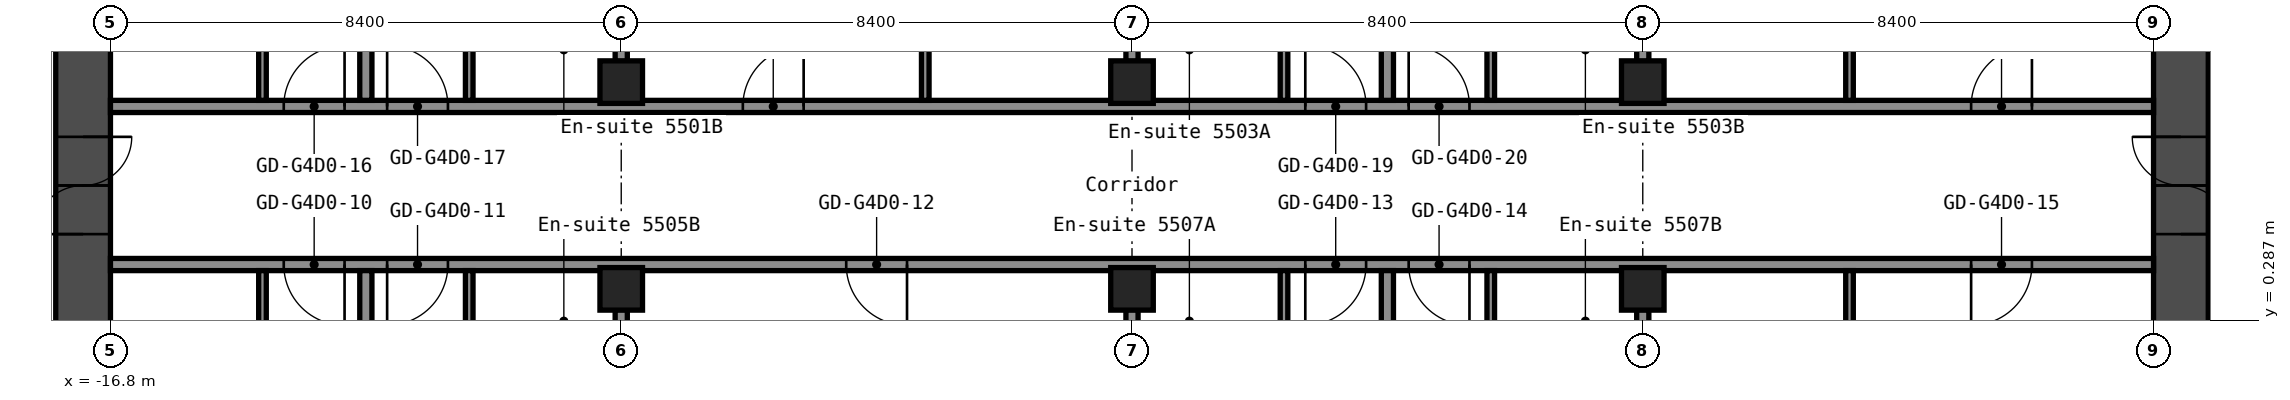
"""IFC4 building model, lengths in metres.
Left out: names, types, materials, properties, quantities, classifications, styles, units other than length and angle.
Written with IfcOpenShell. Run it as: python <this file> out.ifc"""

import sys

from ifc_helpers import new_model, si_unit, direction, frame, frame_2d, origin, origin_2d, place, context, subcontext, project, spatial, rectangle, hollow_rectangle, extrude, element, fill, save


model = new_model("IFC4")
c1 = context("Model", 3, precision=1e-05, world=origin(), true_north=direction((0.0, 1.0)))
c2 = subcontext(c1, "Body", "Model", "MODEL_VIEW")
j1 = project(units=[si_unit("LENGTHUNIT", "METRE"), si_unit("PLANEANGLEUNIT", "RADIAN")], contexts=[c1])
p1 = place(None, origin())
s1 = spatial("IfcSite", under=j1, at=p1, CompositionType="ELEMENT")
p2 = place(p1, origin())
s2 = spatial("IfcBuilding", under=s1, at=p2, CompositionType="ELEMENT")
p3 = place(p2, frame((0.0, 0.0, 196.2)))
s3 = spatial("IfcBuildingStorey", under=s2, at=p3, CompositionType="ELEMENT", Elevation=196.2)
for number, where, z_axis, x_axis in (
    (1, (-8.4, 0.8, 0.0), (0.0, 0.0, 1.0), (1.0, 0.0, 0.0)),
    (2, (-8.4, 4.2, 0.0), (0.0, 0.0, 1.0), (1.0, 0.0, 0.0)),
    (3, (0.0, 0.8, 0.0), (0.0, 0.0, 1.0), (1.0, 0.0, 0.0)),
    (4, (0.0, 4.2, 0.0), (0.0, 0.0, 1.0), (1.0, 0.0, 0.0)),
    (5, (8.4, 0.8, 0.0), (0.0, 0.0, 1.0), (1.0, 0.0, 0.0)),
    (6, (8.4, 4.2, 0.0), (0.0, 0.0, 1.0), (1.0, 0.0, 0.0)),
):
    element("IfcColumn", number, at=place(p3, frame(where, z_axis=z_axis, x_axis=x_axis)), inside=s3, PredefinedType="COLUMN", context=c2, shape_type="SweptSolid", body=[
        extrude(hollow_rectangle(XDim=0.7, YDim=0.7, WallThickness=0.028, at=origin_2d()), origin(), (0.0, 0.0, 1.0), 2.75),
    ])
p4 = place(p3, frame((-17.25, -8.4, 0.0), z_axis=(0.0, 0.0, 1.0), x_axis=(0.0, 1.0, 0.0)))
e7 = element("IfcWall", 7, at=p4, inside=s3, PredefinedType="SHEAR", context=c2, shape_type="SweptSolid", body=[
    extrude(rectangle(XDim=16.8, YDim=0.9, at=frame_2d((8.4, 0.0))), origin(), (0.0, 0.0, 1.0), 2.75),
])
p5 = place(p4, frame((10.1, 0.0, 0.0)))
e8 = element("IfcOpeningElement", 8, at=p5, cuts=e7, PredefinedType="OPENING", context=c2, shape_type="SweptSolid", body=[
    extrude(rectangle(XDim=1.6, YDim=2.1, at=frame_2d((0.8, 1.05))), frame((0.0, 0.46, 0.0), z_axis=(0.0, -1.0, 0.0), x_axis=(1.0, 0.0, 0.0)), (0.0, 0.0, 1.0), 0.92),
])
p6 = place(p3, frame((17.25, -8.4, 0.0), z_axis=(0.0, 0.0, 1.0), x_axis=(0.0, 1.0, 0.0)))
e9 = element("IfcWall", 9, at=p6, inside=s3, PredefinedType="SHEAR", context=c2, shape_type="SweptSolid", body=[
    extrude(rectangle(XDim=16.8, YDim=0.9, at=frame_2d((8.4, 0.0))), origin(), (0.0, 0.0, 1.0), 2.75),
])
p7 = place(p6, frame((10.1, 0.0, 0.0)))
e10 = element("IfcOpeningElement", 10, at=p7, cuts=e9, PredefinedType="OPENING", context=c2, shape_type="SweptSolid", body=[
    extrude(rectangle(XDim=1.6, YDim=2.1, at=frame_2d((0.8, 1.05))), frame((0.0, 0.46, 0.0), z_axis=(0.0, -1.0, 0.0), x_axis=(1.0, 0.0, 0.0)), (0.0, 0.0, 1.0), 0.92),
])
p8 = place(p3, frame((-16.8, 1.2, 0.0), z_axis=(0.0, 0.0, 1.0), x_axis=(1.0, 0.0, 0.0)))
e11 = element("IfcWall", 11, at=p8, inside=s3, PredefinedType="PARTITIONING", context=c2, shape_type="SweptSolid", body=[
    extrude(rectangle(XDim=33.6, YDim=0.2, at=frame_2d((16.8, 0.0))), origin(), (0.0, 0.0, 1.0), 2.75),
])
p9 = place(p8, frame((2.85, 0.0, 0.0)))
e12 = element("IfcOpeningElement", 12, at=p9, cuts=e11, PredefinedType="OPENING", context=c2, shape_type="SweptSolid", body=[
    extrude(rectangle(XDim=1.0, YDim=2.1, at=frame_2d((0.5, 1.05))), frame((0.0, 0.11, 0.0), z_axis=(0.0, -1.0, 0.0), x_axis=(1.0, 0.0, 0.0)), (0.0, 0.0, 1.0), 0.22),
])
p10 = place(p8, frame((4.55, 0.0, 0.0)))
e13 = element("IfcOpeningElement", 13, at=p10, cuts=e11, PredefinedType="OPENING", context=c2, shape_type="SweptSolid", body=[
    extrude(rectangle(XDim=1.0, YDim=2.1, at=frame_2d((0.5, 1.05))), frame((0.0, 0.11, 0.0), z_axis=(0.0, -1.0, 0.0), x_axis=(1.0, 0.0, 0.0)), (0.0, 0.0, 1.0), 0.22),
])
p11 = place(p8, frame((12.1, 0.0, 0.0)))
e14 = element("IfcOpeningElement", 14, at=p11, cuts=e11, PredefinedType="OPENING", context=c2, shape_type="SweptSolid", body=[
    extrude(rectangle(XDim=1.0, YDim=2.1, at=frame_2d((0.5, 1.05))), frame((0.0, 0.11, 0.0), z_axis=(0.0, -1.0, 0.0), x_axis=(1.0, 0.0, 0.0)), (0.0, 0.0, 1.0), 0.22),
])
p12 = place(p8, frame((19.65, 0.0, 0.0)))
e15 = element("IfcOpeningElement", 15, at=p12, cuts=e11, PredefinedType="OPENING", context=c2, shape_type="SweptSolid", body=[
    extrude(rectangle(XDim=1.0, YDim=2.1, at=frame_2d((0.5, 1.05))), frame((0.0, 0.11, 0.0), z_axis=(0.0, -1.0, 0.0), x_axis=(1.0, 0.0, 0.0)), (0.0, 0.0, 1.0), 0.22),
])
p13 = place(p8, frame((21.35, 0.0, 0.0)))
e16 = element("IfcOpeningElement", 16, at=p13, cuts=e11, PredefinedType="OPENING", context=c2, shape_type="SweptSolid", body=[
    extrude(rectangle(XDim=1.0, YDim=2.1, at=frame_2d((0.5, 1.05))), frame((0.0, 0.11, 0.0), z_axis=(0.0, -1.0, 0.0), x_axis=(1.0, 0.0, 0.0)), (0.0, 0.0, 1.0), 0.22),
])
p14 = place(p8, frame((30.6, 0.0, 0.0)))
e17 = element("IfcOpeningElement", 17, at=p14, cuts=e11, PredefinedType="OPENING", context=c2, shape_type="SweptSolid", body=[
    extrude(rectangle(XDim=1.0, YDim=2.1, at=frame_2d((0.5, 1.05))), frame((0.0, 0.11, 0.0), z_axis=(0.0, -1.0, 0.0), x_axis=(1.0, 0.0, 0.0)), (0.0, 0.0, 1.0), 0.22),
])
p15 = place(p3, frame((-16.8, 3.8, 0.0), z_axis=(0.0, 0.0, 1.0), x_axis=(1.0, 0.0, 0.0)))
e18 = element("IfcWall", 18, at=p15, inside=s3, PredefinedType="PARTITIONING", context=c2, shape_type="SweptSolid", body=[
    extrude(rectangle(XDim=33.6, YDim=0.2, at=frame_2d((16.8, 0.0))), origin(), (0.0, 0.0, 1.0), 2.75),
])
p16 = place(p15, frame((2.85, 0.0, 0.0)))
e19 = element("IfcOpeningElement", 19, at=p16, cuts=e18, PredefinedType="OPENING", context=c2, shape_type="SweptSolid", body=[
    extrude(rectangle(XDim=1.0, YDim=2.1, at=frame_2d((0.5, 1.05))), frame((0.0, 0.11, 0.0), z_axis=(0.0, -1.0, 0.0), x_axis=(1.0, 0.0, 0.0)), (0.0, 0.0, 1.0), 0.22),
])
p17 = place(p15, frame((4.55, 0.0, 0.0)))
e20 = element("IfcOpeningElement", 20, at=p17, cuts=e18, PredefinedType="OPENING", context=c2, shape_type="SweptSolid", body=[
    extrude(rectangle(XDim=1.0, YDim=2.1, at=frame_2d((0.5, 1.05))), frame((0.0, 0.11, 0.0), z_axis=(0.0, -1.0, 0.0), x_axis=(1.0, 0.0, 0.0)), (0.0, 0.0, 1.0), 0.22),
])
p18 = place(p15, frame((10.4, 0.0, 0.0)))
e21 = element("IfcOpeningElement", 21, at=p18, cuts=e18, PredefinedType="OPENING", context=c2, shape_type="SweptSolid", body=[
    extrude(rectangle(XDim=1.0, YDim=2.1, at=frame_2d((0.5, 1.05))), frame((0.0, 0.11, 0.0), z_axis=(0.0, -1.0, 0.0), x_axis=(1.0, 0.0, 0.0)), (0.0, 0.0, 1.0), 0.22),
])
p19 = place(p15, frame((19.65, 0.0, 0.0)))
e22 = element("IfcOpeningElement", 22, at=p19, cuts=e18, PredefinedType="OPENING", context=c2, shape_type="SweptSolid", body=[
    extrude(rectangle(XDim=1.0, YDim=2.1, at=frame_2d((0.5, 1.05))), frame((0.0, 0.11, 0.0), z_axis=(0.0, -1.0, 0.0), x_axis=(1.0, 0.0, 0.0)), (0.0, 0.0, 1.0), 0.22),
])
p20 = place(p15, frame((21.35, 0.0, 0.0)))
e23 = element("IfcOpeningElement", 23, at=p20, cuts=e18, PredefinedType="OPENING", context=c2, shape_type="SweptSolid", body=[
    extrude(rectangle(XDim=1.0, YDim=2.1, at=frame_2d((0.5, 1.05))), frame((0.0, 0.11, 0.0), z_axis=(0.0, -1.0, 0.0), x_axis=(1.0, 0.0, 0.0)), (0.0, 0.0, 1.0), 0.22),
])
p21 = place(p15, frame((30.6, 0.0, 0.0)))
e24 = element("IfcOpeningElement", 24, at=p21, cuts=e18, PredefinedType="OPENING", context=c2, shape_type="SweptSolid", body=[
    extrude(rectangle(XDim=1.0, YDim=2.1, at=frame_2d((0.5, 1.05))), frame((0.0, 0.11, 0.0), z_axis=(0.0, -1.0, 0.0), x_axis=(1.0, 0.0, 0.0)), (0.0, 0.0, 1.0), 0.22),
])
p22 = place(p3, frame((-14.3, -1.8, 0.0), z_axis=(0.0, 0.0, 1.0), x_axis=(0.0, 1.0, 0.0)))
e25 = element("IfcWall", 25, at=p22, inside=s3, PredefinedType="PARTITIONING", context=c2, shape_type="SweptSolid", body=[
    extrude(rectangle(XDim=2.9, YDim=0.125, at=frame_2d((1.45, 0.0))), origin(), (0.0, 0.0, 1.0), 2.75),
])
p23 = place(p22, frame((0.6, 0.0, 0.0)))
e26 = element("IfcOpeningElement", 26, at=p23, cuts=e25, PredefinedType="OPENING", context=c2, shape_type="SweptSolid", body=[
    extrude(rectangle(XDim=0.8, YDim=2.1, at=frame_2d((0.4, 1.05))), frame((0.0, 0.073, 0.0), z_axis=(0.0, -1.0, 0.0), x_axis=(1.0, 0.0, 0.0)), (0.0, 0.0, 1.0), 0.145),
])
p24 = place(p3, frame((-14.3, 3.9, 0.0), z_axis=(0.0, 0.0, 1.0), x_axis=(0.0, 1.0, 0.0)))
e27 = element("IfcWall", 27, at=p24, inside=s3, PredefinedType="PARTITIONING", context=c2, shape_type="SweptSolid", body=[
    extrude(rectangle(XDim=2.9, YDim=0.125, at=frame_2d((1.45, 0.0))), origin(), (0.0, 0.0, 1.0), 2.75),
])
p25 = place(p24, frame((1.5, 0.0, 0.0)))
e28 = element("IfcOpeningElement", 28, at=p25, cuts=e27, PredefinedType="OPENING", context=c2, shape_type="SweptSolid", body=[
    extrude(rectangle(XDim=0.8, YDim=2.1, at=frame_2d((0.4, 1.05))), frame((0.0, 0.073, 0.0), z_axis=(0.0, -1.0, 0.0), x_axis=(1.0, 0.0, 0.0)), (0.0, 0.0, 1.0), 0.145),
])
for number, where, z_axis, x_axis in (
    (29, (-12.6, -15.55, 0.0), (0.0, 0.0, 1.0), (0.0, 1.0, 0.0)),
    (30, (-12.6, 3.9, 0.0), (0.0, 0.0, 1.0), (0.0, 1.0, 0.0)),
):
    element("IfcWall", number, at=place(p3, frame(where, z_axis=z_axis, x_axis=x_axis)), inside=s3, PredefinedType="PARTITIONING", context=c2, shape_type="SweptSolid", body=[
        extrude(rectangle(XDim=16.65, YDim=0.2, at=frame_2d((8.325, 0.0))), origin(), (0.0, 0.0, 1.0), 2.75),
    ])
p26 = place(p3, frame((-10.9, -1.8, 0.0), z_axis=(0.0, 0.0, 1.0), x_axis=(0.0, 1.0, 0.0)))
e31 = element("IfcWall", 31, at=p26, inside=s3, PredefinedType="PARTITIONING", context=c2, shape_type="SweptSolid", body=[
    extrude(rectangle(XDim=2.9, YDim=0.125, at=frame_2d((1.45, 0.0))), origin(), (0.0, 0.0, 1.0), 2.75),
])
p27 = place(p26, frame((0.6, 0.0, 0.0)))
e32 = element("IfcOpeningElement", 32, at=p27, cuts=e31, PredefinedType="OPENING", context=c2, shape_type="SweptSolid", body=[
    extrude(rectangle(XDim=0.8, YDim=2.1, at=frame_2d((0.4, 1.05))), frame((0.0, 0.073, 0.0), z_axis=(0.0, -1.0, 0.0), x_axis=(1.0, 0.0, 0.0)), (0.0, 0.0, 1.0), 0.145),
])
p28 = place(p3, frame((-10.9, 3.9, 0.0), z_axis=(0.0, 0.0, 1.0), x_axis=(0.0, 1.0, 0.0)))
e33 = element("IfcWall", 33, at=p28, inside=s3, PredefinedType="PARTITIONING", context=c2, shape_type="SweptSolid", body=[
    extrude(rectangle(XDim=2.9, YDim=0.125, at=frame_2d((1.45, 0.0))), origin(), (0.0, 0.0, 1.0), 2.75),
])
p29 = place(p28, frame((1.5, 0.0, 0.0)))
e34 = element("IfcOpeningElement", 34, at=p29, cuts=e33, PredefinedType="OPENING", context=c2, shape_type="SweptSolid", body=[
    extrude(rectangle(XDim=0.8, YDim=2.1, at=frame_2d((0.4, 1.05))), frame((0.0, 0.073, 0.0), z_axis=(0.0, -1.0, 0.0), x_axis=(1.0, 0.0, 0.0)), (0.0, 0.0, 1.0), 0.145),
])
for number, where, z_axis, x_axis in (
    (35, (-8.4, -15.55, 0.0), (0.0, 0.0, 1.0), (0.0, 1.0, 0.0)),
    (36, (-8.4, 4.54, 0.0), (0.0, 0.0, 1.0), (0.0, 1.0, 0.0)),
):
    element("IfcWall", number, at=place(p3, frame(where, z_axis=z_axis, x_axis=x_axis)), inside=s3, PredefinedType="PARTITIONING", context=c2, shape_type="SweptSolid", body=[
        extrude(rectangle(XDim=16.01, YDim=0.2, at=frame_2d((8.005, 0.0))), origin(), (0.0, 0.0, 1.0), 2.75),
    ])
p30 = place(p3, frame((-3.4, 3.9, 0.0), z_axis=(0.0, 0.0, 1.0), x_axis=(0.0, 1.0, 0.0)))
e37 = element("IfcWall", 37, at=p30, inside=s3, PredefinedType="PARTITIONING", context=c2, shape_type="SweptSolid", body=[
    extrude(rectangle(XDim=3.3, YDim=0.125, at=frame_2d((1.65, 0.0))), origin(), (0.0, 0.0, 1.0), 2.75),
])
for number, where, z_axis, x_axis in (
    (38, (0.0, -15.55, 0.0), (0.0, 0.0, 1.0), (0.0, 1.0, 0.0)),
    (39, (0.0, 4.54, 0.0), (0.0, 0.0, 1.0), (0.0, 1.0, 0.0)),
):
    element("IfcWall", number, at=place(p3, frame(where, z_axis=z_axis, x_axis=x_axis)), inside=s3, PredefinedType="PARTITIONING", context=c2, shape_type="SweptSolid", body=[
        extrude(rectangle(XDim=16.01, YDim=0.2, at=frame_2d((8.005, 0.0))), origin(), (0.0, 0.0, 1.0), 2.75),
    ])
p31 = place(p3, frame((2.5, -1.8, 0.0), z_axis=(0.0, 0.0, 1.0), x_axis=(0.0, 1.0, 0.0)))
e40 = element("IfcWall", 40, at=p31, inside=s3, PredefinedType="PARTITIONING", context=c2, shape_type="SweptSolid", body=[
    extrude(rectangle(XDim=2.9, YDim=0.125, at=frame_2d((1.45, 0.0))), origin(), (0.0, 0.0, 1.0), 2.75),
])
p32 = place(p31, frame((0.6, 0.0, 0.0)))
e41 = element("IfcOpeningElement", 41, at=p32, cuts=e40, PredefinedType="OPENING", context=c2, shape_type="SweptSolid", body=[
    extrude(rectangle(XDim=0.8, YDim=2.1, at=frame_2d((0.4, 1.05))), frame((0.0, 0.073, 0.0), z_axis=(0.0, -1.0, 0.0), x_axis=(1.0, 0.0, 0.0)), (0.0, 0.0, 1.0), 0.145),
])
p33 = place(p3, frame((2.5, 3.9, 0.0), z_axis=(0.0, 0.0, 1.0), x_axis=(0.0, 1.0, 0.0)))
e42 = element("IfcWall", 42, at=p33, inside=s3, PredefinedType="PARTITIONING", context=c2, shape_type="SweptSolid", body=[
    extrude(rectangle(XDim=2.9, YDim=0.125, at=frame_2d((1.45, 0.0))), origin(), (0.0, 0.0, 1.0), 2.75),
])
p34 = place(p33, frame((1.5, 0.0, 0.0)))
e43 = element("IfcOpeningElement", 43, at=p34, cuts=e42, PredefinedType="OPENING", context=c2, shape_type="SweptSolid", body=[
    extrude(rectangle(XDim=0.8, YDim=2.1, at=frame_2d((0.4, 1.05))), frame((0.0, 0.073, 0.0), z_axis=(0.0, -1.0, 0.0), x_axis=(1.0, 0.0, 0.0)), (0.0, 0.0, 1.0), 0.145),
])
for number, where, z_axis, x_axis in (
    (44, (4.2, -15.55, 0.0), (0.0, 0.0, 1.0), (0.0, 1.0, 0.0)),
    (45, (4.2, 3.9, 0.0), (0.0, 0.0, 1.0), (0.0, 1.0, 0.0)),
):
    element("IfcWall", number, at=place(p3, frame(where, z_axis=z_axis, x_axis=x_axis)), inside=s3, PredefinedType="PARTITIONING", context=c2, shape_type="SweptSolid", body=[
        extrude(rectangle(XDim=16.65, YDim=0.2, at=frame_2d((8.325, 0.0))), origin(), (0.0, 0.0, 1.0), 2.75),
    ])
p35 = place(p3, frame((5.9, -1.8, 0.0), z_axis=(0.0, 0.0, 1.0), x_axis=(0.0, 1.0, 0.0)))
e46 = element("IfcWall", 46, at=p35, inside=s3, PredefinedType="PARTITIONING", context=c2, shape_type="SweptSolid", body=[
    extrude(rectangle(XDim=2.9, YDim=0.125, at=frame_2d((1.45, 0.0))), origin(), (0.0, 0.0, 1.0), 2.75),
])
p36 = place(p35, frame((0.6, 0.0, 0.0)))
e47 = element("IfcOpeningElement", 47, at=p36, cuts=e46, PredefinedType="OPENING", context=c2, shape_type="SweptSolid", body=[
    extrude(rectangle(XDim=0.8, YDim=2.1, at=frame_2d((0.4, 1.05))), frame((0.0, 0.073, 0.0), z_axis=(0.0, -1.0, 0.0), x_axis=(1.0, 0.0, 0.0)), (0.0, 0.0, 1.0), 0.145),
])
p37 = place(p3, frame((5.9, 3.9, 0.0), z_axis=(0.0, 0.0, 1.0), x_axis=(0.0, 1.0, 0.0)))
e48 = element("IfcWall", 48, at=p37, inside=s3, PredefinedType="PARTITIONING", context=c2, shape_type="SweptSolid", body=[
    extrude(rectangle(XDim=2.9, YDim=0.125, at=frame_2d((1.45, 0.0))), origin(), (0.0, 0.0, 1.0), 2.75),
])
p38 = place(p37, frame((1.5, 0.0, 0.0)))
e49 = element("IfcOpeningElement", 49, at=p38, cuts=e48, PredefinedType="OPENING", context=c2, shape_type="SweptSolid", body=[
    extrude(rectangle(XDim=0.8, YDim=2.1, at=frame_2d((0.4, 1.05))), frame((0.0, 0.073, 0.0), z_axis=(0.0, -1.0, 0.0), x_axis=(1.0, 0.0, 0.0)), (0.0, 0.0, 1.0), 0.145),
])
for number, where, z_axis, x_axis in (
    (50, (8.4, -15.55, 0.0), (0.0, 0.0, 1.0), (0.0, 1.0, 0.0)),
    (51, (8.4, 4.54, 0.0), (0.0, 0.0, 1.0), (0.0, 1.0, 0.0)),
):
    element("IfcWall", number, at=place(p3, frame(where, z_axis=z_axis, x_axis=x_axis)), inside=s3, PredefinedType="PARTITIONING", context=c2, shape_type="SweptSolid", body=[
        extrude(rectangle(XDim=16.01, YDim=0.2, at=frame_2d((8.005, 0.0))), origin(), (0.0, 0.0, 1.0), 2.75),
    ])
for number, where, z_axis, x_axis in (
    (52, (11.8, -2.2, 0.0), (0.0, 0.0, 1.0), (0.0, 1.0, 0.0)),
    (53, (11.8, 3.9, 0.0), (0.0, 0.0, 1.0), (0.0, 1.0, 0.0)),
):
    element("IfcWall", number, at=place(p3, frame(where, z_axis=z_axis, x_axis=x_axis)), inside=s3, PredefinedType="PARTITIONING", context=c2, shape_type="SweptSolid", body=[
        extrude(rectangle(XDim=3.3, YDim=0.125, at=frame_2d((1.65, 0.0))), origin(), (0.0, 0.0, 1.0), 2.75),
    ])
p39 = place(p5, origin())
e54 = element("IfcDoor", 54, at=p39, inside=s3, OperationType="DOUBLE_DOOR_SINGLE_SWING", PredefinedType="DOOR", context=c2, shape_type="SweptSolid", body=[
    extrude(rectangle(XDim=1.6, YDim=2.1, at=frame_2d((0.8, 1.05))), frame((0.0, 0.025, 0.0), z_axis=(0.0, -1.0, 0.0), x_axis=(1.0, 0.0, 0.0)), (0.0, 0.0, 1.0), 0.05),
])
fill(e8, e54)
p40 = place(p7, origin())
e55 = element("IfcDoor", 55, at=p40, inside=s3, OperationType="DOUBLE_DOOR_SINGLE_SWING", PredefinedType="DOOR", context=c2, shape_type="SweptSolid", body=[
    extrude(rectangle(XDim=1.6, YDim=2.1, at=frame_2d((0.8, 1.05))), frame((0.0, 0.025, 0.0), z_axis=(0.0, -1.0, 0.0), x_axis=(1.0, 0.0, 0.0)), (0.0, 0.0, 1.0), 0.05),
])
fill(e10, e55)
p41 = place(p9, origin())
e56 = element("IfcDoor", 56, at=p41, inside=s3, OperationType="SINGLE_SWING_RIGHT", PredefinedType="DOOR", context=c2, shape_type="SweptSolid", body=[
    extrude(rectangle(XDim=1.0, YDim=2.1, at=frame_2d((0.5, 1.05))), frame((0.0, 0.025, 0.0), z_axis=(0.0, -1.0, 0.0), x_axis=(1.0, 0.0, 0.0)), (0.0, 0.0, 1.0), 0.05),
])
fill(e12, e56)
p42 = place(p10, origin())
e57 = element("IfcDoor", 57, at=p42, inside=s3, OperationType="SINGLE_SWING_LEFT", PredefinedType="DOOR", context=c2, shape_type="SweptSolid", body=[
    extrude(rectangle(XDim=1.0, YDim=2.1, at=frame_2d((0.5, 1.05))), frame((0.0, 0.025, 0.0), z_axis=(0.0, -1.0, 0.0), x_axis=(1.0, 0.0, 0.0)), (0.0, 0.0, 1.0), 0.05),
])
fill(e13, e57)
p43 = place(p11, origin())
e58 = element("IfcDoor", 58, at=p43, inside=s3, OperationType="SINGLE_SWING_RIGHT", PredefinedType="DOOR", context=c2, shape_type="SweptSolid", body=[
    extrude(rectangle(XDim=1.0, YDim=2.1, at=frame_2d((0.5, 1.05))), frame((0.0, 0.025, 0.0), z_axis=(0.0, -1.0, 0.0), x_axis=(1.0, 0.0, 0.0)), (0.0, 0.0, 1.0), 0.05),
])
fill(e14, e58)
p44 = place(p12, origin())
e59 = element("IfcDoor", 59, at=p44, inside=s3, OperationType="SINGLE_SWING_LEFT", PredefinedType="DOOR", context=c2, shape_type="SweptSolid", body=[
    extrude(rectangle(XDim=1.0, YDim=2.1, at=frame_2d((0.5, 1.05))), frame((0.0, 0.025, 0.0), z_axis=(0.0, -1.0, 0.0), x_axis=(1.0, 0.0, 0.0)), (0.0, 0.0, 1.0), 0.05),
])
fill(e15, e59)
p45 = place(p13, origin())
e60 = element("IfcDoor", 60, at=p45, inside=s3, OperationType="SINGLE_SWING_RIGHT", PredefinedType="DOOR", context=c2, shape_type="SweptSolid", body=[
    extrude(rectangle(XDim=1.0, YDim=2.1, at=frame_2d((0.5, 1.05))), frame((0.0, 0.025, 0.0), z_axis=(0.0, -1.0, 0.0), x_axis=(1.0, 0.0, 0.0)), (0.0, 0.0, 1.0), 0.05),
])
fill(e16, e60)
p46 = place(p14, origin())
e61 = element("IfcDoor", 61, at=p46, inside=s3, OperationType="SINGLE_SWING_LEFT", PredefinedType="DOOR", context=c2, shape_type="SweptSolid", body=[
    extrude(rectangle(XDim=1.0, YDim=2.1, at=frame_2d((0.5, 1.05))), frame((0.0, 0.025, 0.0), z_axis=(0.0, -1.0, 0.0), x_axis=(1.0, 0.0, 0.0)), (0.0, 0.0, 1.0), 0.05),
])
fill(e17, e61)
p47 = place(p16, origin())
e62 = element("IfcDoor", 62, at=p47, inside=s3, OperationType="SINGLE_SWING_LEFT", PredefinedType="DOOR", context=c2, shape_type="SweptSolid", body=[
    extrude(rectangle(XDim=1.0, YDim=2.1, at=frame_2d((0.5, 1.05))), frame((0.0, 0.025, 0.0), z_axis=(0.0, -1.0, 0.0), x_axis=(1.0, 0.0, 0.0)), (0.0, 0.0, 1.0), 0.05),
])
fill(e19, e62)
p48 = place(p17, origin())
e63 = element("IfcDoor", 63, at=p48, inside=s3, OperationType="SINGLE_SWING_RIGHT", PredefinedType="DOOR", context=c2, shape_type="SweptSolid", body=[
    extrude(rectangle(XDim=1.0, YDim=2.1, at=frame_2d((0.5, 1.05))), frame((0.0, 0.025, 0.0), z_axis=(0.0, -1.0, 0.0), x_axis=(1.0, 0.0, 0.0)), (0.0, 0.0, 1.0), 0.05),
])
fill(e20, e63)
p49 = place(p18, origin())
e64 = element("IfcDoor", 64, at=p49, inside=s3, OperationType="SINGLE_SWING_LEFT", PredefinedType="DOOR", context=c2, shape_type="SweptSolid", body=[
    extrude(rectangle(XDim=1.0, YDim=2.1, at=frame_2d((0.5, 1.05))), frame((0.0, 0.025, 0.0), z_axis=(0.0, -1.0, 0.0), x_axis=(1.0, 0.0, 0.0)), (0.0, 0.0, 1.0), 0.05),
])
fill(e21, e64)
p50 = place(p19, origin())
e65 = element("IfcDoor", 65, at=p50, inside=s3, OperationType="SINGLE_SWING_RIGHT", PredefinedType="DOOR", context=c2, shape_type="SweptSolid", body=[
    extrude(rectangle(XDim=1.0, YDim=2.1, at=frame_2d((0.5, 1.05))), frame((0.0, 0.025, 0.0), z_axis=(0.0, -1.0, 0.0), x_axis=(1.0, 0.0, 0.0)), (0.0, 0.0, 1.0), 0.05),
])
fill(e22, e65)
p51 = place(p20, origin())
e66 = element("IfcDoor", 66, at=p51, inside=s3, OperationType="SINGLE_SWING_RIGHT", PredefinedType="DOOR", context=c2, shape_type="SweptSolid", body=[
    extrude(rectangle(XDim=1.0, YDim=2.1, at=frame_2d((0.5, 1.05))), frame((0.0, 0.025, 0.0), z_axis=(0.0, -1.0, 0.0), x_axis=(1.0, 0.0, 0.0)), (0.0, 0.0, 1.0), 0.05),
])
fill(e23, e66)
p52 = place(p21, origin())
e67 = element("IfcDoor", 67, at=p52, inside=s3, OperationType="SINGLE_SWING_LEFT", PredefinedType="DOOR", context=c2, shape_type="SweptSolid", body=[
    extrude(rectangle(XDim=1.0, YDim=2.1, at=frame_2d((0.5, 1.05))), frame((0.0, 0.025, 0.0), z_axis=(0.0, -1.0, 0.0), x_axis=(1.0, 0.0, 0.0)), (0.0, 0.0, 1.0), 0.05),
])
fill(e24, e67)
save(model, sys.argv[1])
